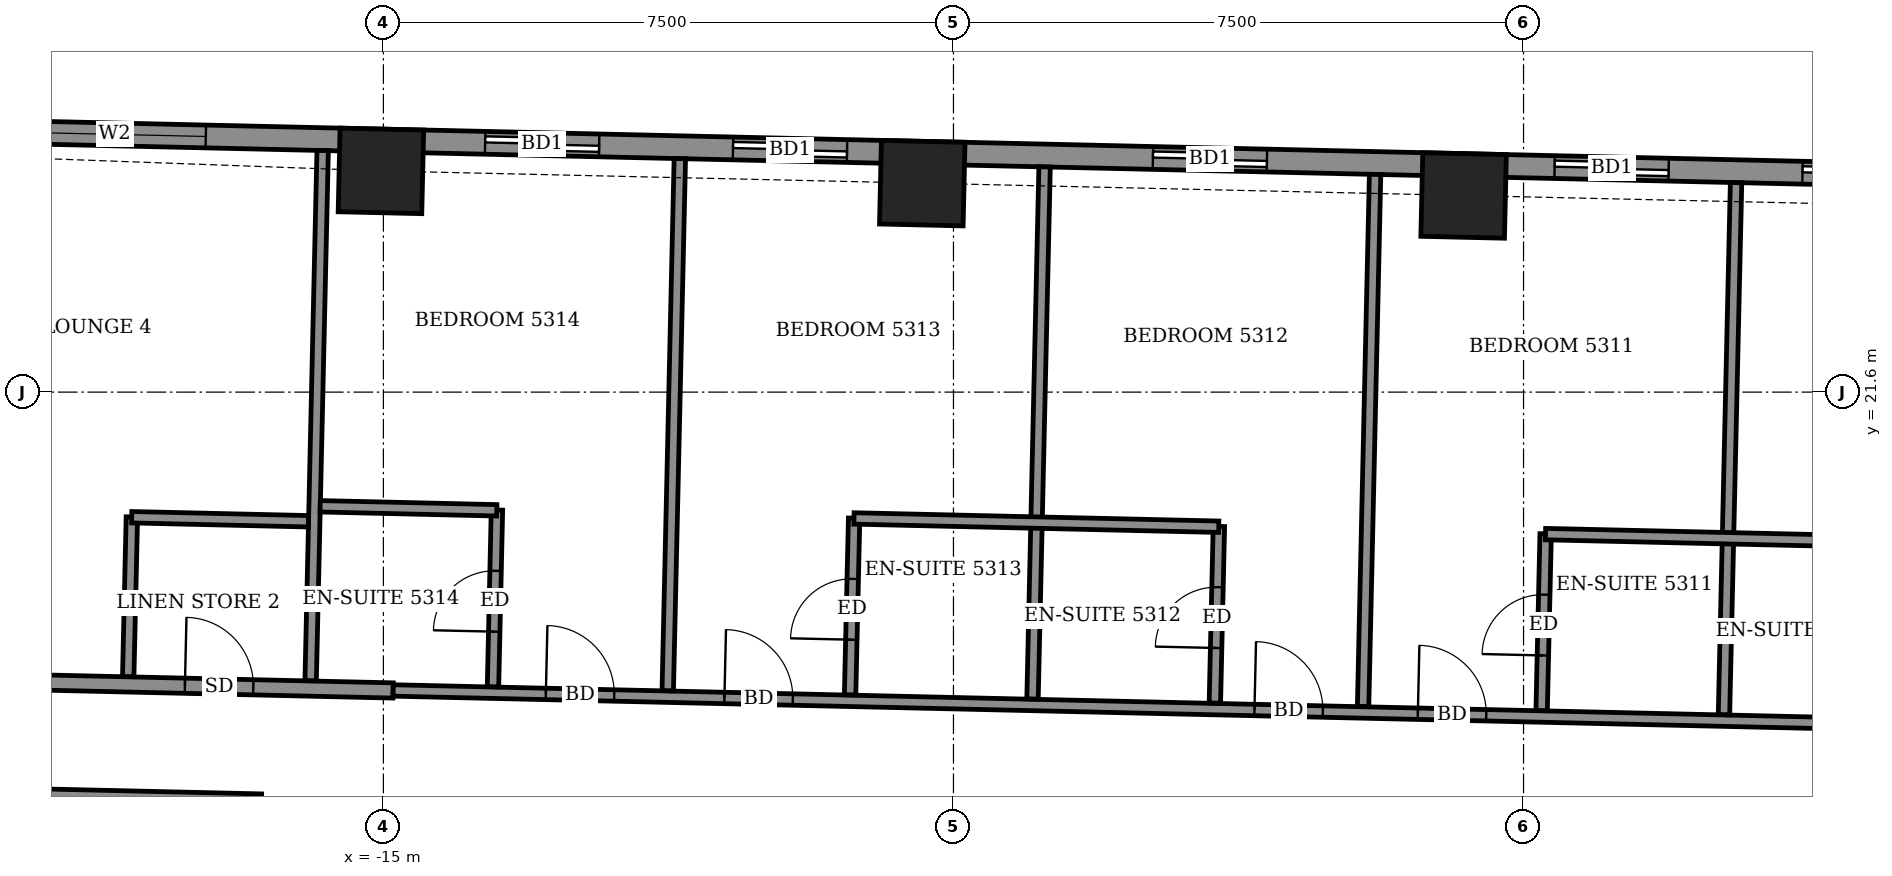
"""IFC4 building model, lengths in metres.
Left out: names, types, materials, properties, quantities, classifications, styles, units other than length and angle.
Written with IfcOpenShell. Run it as: python <this file> out.ifc"""

import sys

from ifc_helpers import new_model, si_unit, direction, frame, frame_2d, origin, origin_2d, place, context, subcontext, project, spatial, rectangle, extrude, element, fill, save


model = new_model("IFC4")
c1 = context("Model", 3, precision=1e-05, world=origin(), true_north=direction((0.0, 1.0)))
c2 = subcontext(c1, "Body", "Model", "MODEL_VIEW")
j1 = project(units=[si_unit("LENGTHUNIT", "METRE"), si_unit("PLANEANGLEUNIT", "RADIAN")], contexts=[c1])
p1 = place(None, origin())
s1 = spatial("IfcSite", under=j1, at=p1, CompositionType="ELEMENT")
p2 = place(p1, origin())
s2 = spatial("IfcBuilding", under=s1, at=p2, CompositionType="ELEMENT")
p3 = place(p2, frame((0.0, 0.0, 208.7)))
s3 = spatial("IfcBuildingStorey", under=s2, at=p3, CompositionType="ELEMENT", Elevation=208.7)
for number, where, z_axis, x_axis in (
    (1, (-0.789, 24.187, -0.55), (0.0, 0.0, 1.0), (-1.0, 0.023, 0.0)),
    (2, (-7.91, 24.349, -0.55), (0.0, 0.0, 1.0), (-1.0, 0.023, 0.0)),
    (3, (-15.032, 24.51, -0.55), (0.0, 0.0, 1.0), (-1.0, 0.023, 0.0)),
):
    element("IfcColumn", number, at=place(p3, frame(where, z_axis=z_axis, x_axis=x_axis)), inside=s3, PredefinedType="COLUMN", context=c2, shape_type="SweptSolid", body=[
        extrude(rectangle(XDim=1.1, YDim=1.1, at=origin_2d()), origin(), (0.0, 0.0, 1.0), 3.6),
    ])
p4 = place(p3, frame((20.437, 24.106, 0.0), z_axis=(0.0, 0.0, 1.0), x_axis=(-0.999742506232, 0.022691875925, 0.0)))
e4 = element("IfcWall", 4, at=p4, inside=s3, PredefinedType="SOLIDWALL", context=c2, shape_type="SweptSolid", body=[
    extrude(rectangle(XDim=42.444, YDim=0.3, at=frame_2d((21.222, 0.0))), origin(), (0.0, 0.0, 1.0), 2.55),
])
p5 = place(p4, frame((1.563, 0.0, 0.0)))
e5 = element("IfcOpeningElement", 5, at=p5, cuts=e4, PredefinedType="OPENING", context=c2, shape_type="SweptSolid", body=[
    extrude(rectangle(XDim=1.5, YDim=2.4, at=frame_2d((0.75, 1.2))), frame((0.0, 0.16, 0.0), z_axis=(0.0, -1.0, 0.0), x_axis=(1.0, 0.0, 0.0)), (0.0, 0.0, 1.0), 0.32),
])
p6 = place(p4, frame((4.584, 0.0, 0.0)))
e6 = element("IfcOpeningElement", 6, at=p6, cuts=e4, PredefinedType="OPENING", context=c2, shape_type="SweptSolid", body=[
    extrude(rectangle(XDim=1.5, YDim=2.4, at=frame_2d((0.75, 1.2))), frame((0.0, 0.16, 0.0), z_axis=(0.0, -1.0, 0.0), x_axis=(1.0, 0.0, 0.0)), (0.0, 0.0, 1.0), 0.32),
])
p7 = place(p4, frame((10.269, 0.0, 0.0)))
e7 = element("IfcOpeningElement", 7, at=p7, cuts=e4, PredefinedType="OPENING", context=c2, shape_type="SweptSolid", body=[
    extrude(rectangle(XDim=1.5, YDim=2.4, at=frame_2d((0.75, 1.2))), frame((0.0, 0.16, 0.0), z_axis=(0.0, -1.0, 0.0), x_axis=(1.0, 0.0, 0.0)), (0.0, 0.0, 1.0), 0.32),
])
p8 = place(p4, frame((15.271, 0.0, 0.0)))
e8 = element("IfcOpeningElement", 8, at=p8, cuts=e4, PredefinedType="OPENING", context=c2, shape_type="SweptSolid", body=[
    extrude(rectangle(XDim=1.5, YDim=2.4, at=frame_2d((0.75, 1.2))), frame((0.0, 0.16, 0.0), z_axis=(0.0, -1.0, 0.0), x_axis=(1.0, 0.0, 0.0)), (0.0, 0.0, 1.0), 0.32),
])
p9 = place(p4, frame((18.533, 0.0, 0.0)))
e9 = element("IfcOpeningElement", 9, at=p9, cuts=e4, PredefinedType="OPENING", context=c2, shape_type="SweptSolid", body=[
    extrude(rectangle(XDim=1.5, YDim=2.4, at=frame_2d((0.75, 1.2))), frame((0.0, 0.16, 0.0), z_axis=(0.0, -1.0, 0.0), x_axis=(1.0, 0.0, 0.0)), (0.0, 0.0, 1.0), 0.32),
])
p10 = place(p4, frame((23.819, 0.0, 0.0)))
e10 = element("IfcOpeningElement", 10, at=p10, cuts=e4, PredefinedType="OPENING", context=c2, shape_type="SweptSolid", body=[
    extrude(rectangle(XDim=1.5, YDim=2.4, at=frame_2d((0.75, 1.2))), frame((0.0, 0.16, 0.0), z_axis=(0.0, -1.0, 0.0), x_axis=(1.0, 0.0, 0.0)), (0.0, 0.0, 1.0), 0.32),
])
p11 = place(p4, frame((29.345, 0.0, 0.0)))
e11 = element("IfcOpeningElement", 11, at=p11, cuts=e4, PredefinedType="OPENING", context=c2, shape_type="SweptSolid", body=[
    extrude(rectangle(XDim=1.5, YDim=2.4, at=frame_2d((0.75, 1.2))), frame((0.0, 0.16, 0.0), z_axis=(0.0, -1.0, 0.0), x_axis=(1.0, 0.0, 0.0)), (0.0, 0.0, 1.0), 0.32),
])
p12 = place(p4, frame((32.607, 0.0, 0.0)))
e12 = element("IfcOpeningElement", 12, at=p12, cuts=e4, PredefinedType="OPENING", context=c2, shape_type="SweptSolid", body=[
    extrude(rectangle(XDim=1.5, YDim=2.4, at=frame_2d((0.75, 1.2))), frame((0.0, 0.16, 0.0), z_axis=(0.0, -1.0, 0.0), x_axis=(1.0, 0.0, 0.0)), (0.0, 0.0, 1.0), 0.32),
])
p13 = place(p4, frame((37.783, 0.0, 0.9)))
e13 = element("IfcOpeningElement", 13, at=p13, cuts=e4, PredefinedType="OPENING", context=c2, shape_type="SweptSolid", body=[
    extrude(rectangle(XDim=2.4, YDim=1.5, at=frame_2d((1.2, 0.75))), frame((0.0, 0.16, 0.0), z_axis=(0.0, -1.0, 0.0), x_axis=(1.0, 0.0, 0.0)), (0.0, 0.0, 1.0), 0.32),
])
p14 = place(p3, frame((-25.743, 16.422, 0.0), z_axis=(0.0, 0.0, 1.0), x_axis=(0.999741076645, -0.022754772455, 0.0)))
e14 = element("IfcWall", 14, at=p14, inside=s3, PredefinedType="PARTITIONING", context=c2, shape_type="SweptSolid", body=[
    extrude(rectangle(XDim=9.141, YDim=0.2, at=frame_2d((4.571, 0.0))), origin(), (0.0, 0.0, 1.0), 3.05),
])
p15 = place(p14, frame((3.371, 0.0, 0.0)))
e15 = element("IfcOpeningElement", 15, at=p15, cuts=e14, PredefinedType="OPENING", context=c2, shape_type="SweptSolid", body=[
    extrude(rectangle(XDim=1.0, YDim=2.1, at=frame_2d((0.5, 1.05))), frame((0.0, 0.11, 0.0), z_axis=(0.0, -1.0, 0.0), x_axis=(1.0, 0.0, 0.0)), (0.0, 0.0, 1.0), 0.22),
])
p16 = place(p3, frame((-25.709, 17.921, 0.0), z_axis=(0.0, 0.0, 1.0), x_axis=(0.999742764922, -0.022680475901, 0.0)))
e16 = element("IfcWall", 16, at=p16, inside=s3, PredefinedType="PARTITIONING", context=c2, shape_type="SweptSolid", body=[
    extrude(rectangle(XDim=10.84, YDim=0.2, at=frame_2d((5.42, 0.0))), origin(), (0.0, 0.0, 1.0), 3.05),
])
p17 = place(p16, frame((2.475, 0.0, 0.0)))
e17 = element("IfcOpeningElement", 17, at=p17, cuts=e16, PredefinedType="OPENING", context=c2, shape_type="SweptSolid", body=[
    extrude(rectangle(XDim=1.0, YDim=2.1, at=frame_2d((0.5, 1.05))), frame((0.0, 0.11, 0.0), z_axis=(0.0, -1.0, 0.0), x_axis=(1.0, 0.0, 0.0)), (0.0, 0.0, 1.0), 0.22),
])
p18 = place(p16, frame((8.1, 0.0, 0.0)))
e18 = element("IfcOpeningElement", 18, at=p18, cuts=e16, PredefinedType="OPENING", context=c2, shape_type="SweptSolid", body=[
    extrude(rectangle(XDim=0.9, YDim=2.1, at=frame_2d((0.45, 1.05))), frame((0.0, 0.11, 0.0), z_axis=(0.0, -1.0, 0.0), x_axis=(1.0, 0.0, 0.0)), (0.0, 0.0, 1.0), 0.22),
])
p19 = place(p3, frame((-14.871, 17.675, 0.0), z_axis=(0.0, 0.0, 1.0), x_axis=(0.999742359486, -0.02269834024, 0.0)))
e19 = element("IfcWall", 19, at=p19, inside=s3, PredefinedType="PARTITIONING", context=c2, shape_type="SweptSolid", body=[
    extrude(rectangle(XDim=30.536, YDim=0.15, at=frame_2d((15.268, 0.0))), origin(), (0.0, 0.0, 1.0), 3.05),
])
p20 = place(p19, frame((29.436, 0.0, 0.0)))
e20 = element("IfcOpeningElement", 20, at=p20, cuts=e19, PredefinedType="OPENING", context=c2, shape_type="SweptSolid", body=[
    extrude(rectangle(XDim=0.9, YDim=2.1, at=frame_2d((0.45, 1.05))), frame((0.0, 0.085, 0.0), z_axis=(0.0, -1.0, 0.0), x_axis=(1.0, 0.0, 0.0)), (0.0, 0.0, 1.0), 0.17),
])
p21 = place(p19, frame((22.484, 0.0, 0.0)))
e21 = element("IfcOpeningElement", 21, at=p21, cuts=e19, PredefinedType="OPENING", context=c2, shape_type="SweptSolid", body=[
    extrude(rectangle(XDim=0.9, YDim=2.1, at=frame_2d((0.45, 1.05))), frame((0.0, 0.085, 0.0), z_axis=(0.0, -1.0, 0.0), x_axis=(1.0, 0.0, 0.0)), (0.0, 0.0, 1.0), 0.17),
])
p22 = place(p19, frame((20.434, 0.0, 0.0)))
e22 = element("IfcOpeningElement", 22, at=p22, cuts=e19, PredefinedType="OPENING", context=c2, shape_type="SweptSolid", body=[
    extrude(rectangle(XDim=0.9, YDim=2.1, at=frame_2d((0.45, 1.05))), frame((0.0, 0.085, 0.0), z_axis=(0.0, -1.0, 0.0), x_axis=(1.0, 0.0, 0.0)), (0.0, 0.0, 1.0), 0.17),
])
p23 = place(p19, frame((13.484, 0.0, 0.0)))
e23 = element("IfcOpeningElement", 23, at=p23, cuts=e19, PredefinedType="OPENING", context=c2, shape_type="SweptSolid", body=[
    extrude(rectangle(XDim=0.9, YDim=2.1, at=frame_2d((0.45, 1.05))), frame((0.0, 0.085, 0.0), z_axis=(0.0, -1.0, 0.0), x_axis=(1.0, 0.0, 0.0)), (0.0, 0.0, 1.0), 0.17),
])
p24 = place(p19, frame((11.334, 0.0, 0.0)))
e24 = element("IfcOpeningElement", 24, at=p24, cuts=e19, PredefinedType="OPENING", context=c2, shape_type="SweptSolid", body=[
    extrude(rectangle(XDim=0.9, YDim=2.1, at=frame_2d((0.45, 1.05))), frame((0.0, 0.085, 0.0), z_axis=(0.0, -1.0, 0.0), x_axis=(1.0, 0.0, 0.0)), (0.0, 0.0, 1.0), 0.17),
])
p25 = place(p19, frame((4.359, 0.0, 0.0)))
e25 = element("IfcOpeningElement", 25, at=p25, cuts=e19, PredefinedType="OPENING", context=c2, shape_type="SweptSolid", body=[
    extrude(rectangle(XDim=0.9, YDim=2.1, at=frame_2d((0.45, 1.05))), frame((0.0, 0.085, 0.0), z_axis=(0.0, -1.0, 0.0), x_axis=(1.0, 0.0, 0.0)), (0.0, 0.0, 1.0), 0.17),
])
p26 = place(p19, frame((2.009, 0.0, 0.0)))
e26 = element("IfcOpeningElement", 26, at=p26, cuts=e19, PredefinedType="OPENING", context=c2, shape_type="SweptSolid", body=[
    extrude(rectangle(XDim=0.9, YDim=2.1, at=frame_2d((0.45, 1.05))), frame((0.0, 0.085, 0.0), z_axis=(0.0, -1.0, 0.0), x_axis=(1.0, 0.0, 0.0)), (0.0, 0.0, 1.0), 0.17),
])
p27 = place(p3, frame((-18.357, 17.858, 0.0), z_axis=(0.0, 0.0, 1.0), x_axis=(0.022779486249, 0.999740513837, 0.0)))
e27 = element("IfcWall", 27, at=p27, inside=s3, PredefinedType="PARTITIONING", context=c2, shape_type="SweptSolid", body=[
    extrude(rectangle(XDim=2.101, YDim=0.15, at=frame_2d((1.05, 0.0))), origin(), (0.0, 0.0, 1.0), 3.05),
])
p28 = place(p3, frame((-15.957, 17.804, 0.0), z_axis=(0.0, 0.0, 1.0), x_axis=(0.022643496158, 0.999743603171, 0.0)))
e28 = element("IfcWall", 28, at=p28, inside=s3, PredefinedType="PARTITIONING", context=c2, shape_type="SweptSolid", body=[
    extrude(rectangle(XDim=6.976, YDim=0.15, at=frame_2d((3.488, 0.0))), origin(), (0.0, 0.0, 1.0), 2.55),
])
p29 = place(p3, frame((-13.558, 17.724, 0.0), z_axis=(0.0, 0.0, 1.0), x_axis=(0.022361308448, 0.999749954681, 0.0)))
e29 = element("IfcWall", 29, at=p29, inside=s3, PredefinedType="PARTITIONING", context=c2, shape_type="SweptSolid", body=[
    extrude(rectangle(XDim=2.325, YDim=0.15, at=frame_2d((1.163, 0.0))), origin(), (0.0, 0.0, 1.0), 3.05),
])
p30 = place(p29, frame((0.725, 0.0, 0.0)))
e30 = element("IfcOpeningElement", 30, at=p30, cuts=e29, PredefinedType="OPENING", context=c2, shape_type="SweptSolid", body=[
    extrude(rectangle(XDim=0.8, YDim=2.1, at=frame_2d((0.4, 1.05))), frame((0.0, 0.085, 0.0), z_axis=(0.0, -1.0, 0.0), x_axis=(1.0, 0.0, 0.0)), (0.0, 0.0, 1.0), 0.17),
])
p31 = place(p3, frame((-11.259, 17.672, 0.0), z_axis=(0.0, 0.0, 1.0), x_axis=(0.022699227919, 0.999742339331, 0.0)))
e31 = element("IfcWall", 31, at=p31, inside=s3, PredefinedType="PARTITIONING", context=c2, shape_type="SweptSolid", body=[
    extrude(rectangle(XDim=7.002, YDim=0.15, at=frame_2d((3.501, 0.0))), origin(), (0.0, 0.0, 1.0), 2.5),
])
p32 = place(p3, frame((-8.86, 17.618, 0.0), z_axis=(0.0, 0.0, 1.0), x_axis=(0.022895561926, 0.999737862264, 0.0)))
e32 = element("IfcWall", 32, at=p32, inside=s3, PredefinedType="PARTITIONING", context=c2, shape_type="SweptSolid", body=[
    extrude(rectangle(XDim=2.324, YDim=0.15, at=frame_2d((1.162, 0.0))), origin(), (0.0, 0.0, 1.0), 3.05),
])
p33 = place(p32, frame((0.725, 0.0, 0.0)))
e33 = element("IfcOpeningElement", 33, at=p33, cuts=e32, PredefinedType="OPENING", context=c2, shape_type="SweptSolid", body=[
    extrude(rectangle(XDim=0.8, YDim=2.1, at=frame_2d((0.4, 1.05))), frame((0.0, 0.085, 0.0), z_axis=(0.0, -1.0, 0.0), x_axis=(1.0, 0.0, 0.0)), (0.0, 0.0, 1.0), 0.17),
])
p34 = place(p3, frame((-6.46, 17.563, 0.0), z_axis=(0.0, 0.0, 1.0), x_axis=(0.022699227919, 0.999742339331, 0.0)))
e34 = element("IfcWall", 34, at=p34, inside=s3, PredefinedType="PARTITIONING", context=c2, shape_type="SweptSolid", body=[
    extrude(rectangle(XDim=7.002, YDim=0.15, at=frame_2d((3.501, 0.0))), origin(), (0.0, 0.0, 1.0), 2.5),
])
p35 = place(p3, frame((-4.061, 17.509, 0.0), z_axis=(0.0, 0.0, 1.0), x_axis=(0.02279059109, 0.999740260747, 0.0)))
e35 = element("IfcWall", 35, at=p35, inside=s3, PredefinedType="PARTITIONING", context=c2, shape_type="SweptSolid", body=[
    extrude(rectangle(XDim=2.324, YDim=0.15, at=frame_2d((1.162, 0.0))), origin(), (0.0, 0.0, 1.0), 3.05),
])
p36 = place(p35, frame((0.725, 0.0, 0.0)))
e36 = element("IfcOpeningElement", 36, at=p36, cuts=e35, PredefinedType="OPENING", context=c2, shape_type="SweptSolid", body=[
    extrude(rectangle(XDim=0.8, YDim=2.1, at=frame_2d((0.4, 1.05))), frame((0.0, 0.085, 0.0), z_axis=(0.0, -1.0, 0.0), x_axis=(1.0, 0.0, 0.0)), (0.0, 0.0, 1.0), 0.17),
])
p37 = place(p3, frame((-2.111, 17.465, 0.0), z_axis=(0.0, 0.0, 1.0), x_axis=(0.022597827698, 0.999744636486, 0.0)))
e37 = element("IfcWall", 37, at=p37, inside=s3, PredefinedType="PARTITIONING", context=c2, shape_type="SweptSolid", body=[
    extrude(rectangle(XDim=7.001, YDim=0.15, at=frame_2d((3.5, 0.0))), origin(), (0.0, 0.0, 1.0), 2.5),
])
p38 = place(p3, frame((0.238, 17.411, 0.0), z_axis=(0.0, 0.0, 1.0), x_axis=(0.022778632478, 0.99974053329, 0.0)))
e38 = element("IfcWall", 38, at=p38, inside=s3, PredefinedType="PARTITIONING", context=c2, shape_type="SweptSolid", body=[
    extrude(rectangle(XDim=2.326, YDim=0.15, at=frame_2d((1.163, 0.0))), origin(), (0.0, 0.0, 1.0), 3.05),
])
p39 = place(p38, frame((0.725, 0.0, 0.0)))
e39 = element("IfcOpeningElement", 39, at=p39, cuts=e38, PredefinedType="OPENING", context=c2, shape_type="SweptSolid", body=[
    extrude(rectangle(XDim=0.8, YDim=2.1, at=frame_2d((0.4, 1.05))), frame((0.0, 0.085, 0.0), z_axis=(0.0, -1.0, 0.0), x_axis=(1.0, 0.0, 0.0)), (0.0, 0.0, 1.0), 0.17),
])
p40 = place(p3, frame((2.637, 17.357, 0.0), z_axis=(0.0, 0.0, 1.0), x_axis=(0.022702393474, 0.999742267452, 0.0)))
e40 = element("IfcWall", 40, at=p40, inside=s3, PredefinedType="PARTITIONING", context=c2, shape_type="SweptSolid", body=[
    extrude(rectangle(XDim=7.001, YDim=0.15, at=frame_2d((3.5, 0.0))), origin(), (0.0, 0.0, 1.0), 2.5),
])
for number, where, z_axis, x_axis in (
    (41, (-18.311, 19.954, 0.0), (0.0, 0.0, 1.0), (1.0, -0.023, 0.0)),
    (42, (-15.832, 20.098, 0.0), (0.0, 0.0, 1.0), (1.0, -0.023, 0.0)),
):
    element("IfcWall", number, at=place(p3, frame(where, z_axis=z_axis, x_axis=x_axis)), inside=s3, PredefinedType="PARTITIONING", context=c2, shape_type="SweptSolid", body=[
        extrude(rectangle(XDim=2.324, YDim=0.15, at=frame_2d((1.162, 0.0))), origin(), (0.0, 0.0, 1.0), 3.05),
    ])
p41 = place(p3, frame((-8.809, 19.938, 0.0), z_axis=(0.0, 0.0, 1.0), x_axis=(0.999742701292, -0.022683280499, 0.0)))
e43 = element("IfcWall", 43, at=p41, inside=s3, PredefinedType="PARTITIONING", context=c2, shape_type="SweptSolid", body=[
    extrude(rectangle(XDim=4.8, YDim=0.15, at=frame_2d((2.4, 0.0))), origin(), (0.0, 0.0, 1.0), 3.05),
])
p42 = place(p3, frame((0.289, 19.732, 0.0), z_axis=(0.0, 0.0, 1.0), x_axis=(0.999742570398, -0.022689048768, 0.0)))
e44 = element("IfcWall", 44, at=p42, inside=s3, PredefinedType="PARTITIONING", context=c2, shape_type="SweptSolid", body=[
    extrude(rectangle(XDim=4.799, YDim=0.15, at=frame_2d((2.399, 0.0))), origin(), (0.0, 0.0, 1.0), 3.05),
])
p43 = place(p8, origin())
e45 = element("IfcDoor", 45, at=p43, inside=s3, OperationType="SLIDING_TO_LEFT", PredefinedType="DOOR", context=c2, shape_type="SweptSolid", body=[
    extrude(rectangle(XDim=1.5, YDim=2.4, at=frame_2d((0.75, 1.2))), frame((0.0, 0.025, 0.0), z_axis=(0.0, -1.0, 0.0), x_axis=(1.0, 0.0, 0.0)), (0.0, 0.0, 1.0), 0.05),
])
fill(e8, e45)
p44 = place(p9, origin())
e46 = element("IfcDoor", 46, at=p44, inside=s3, OperationType="SLIDING_TO_LEFT", PredefinedType="DOOR", context=c2, shape_type="SweptSolid", body=[
    extrude(rectangle(XDim=1.5, YDim=2.4, at=frame_2d((0.75, 1.2))), frame((0.0, 0.025, 0.0), z_axis=(0.0, -1.0, 0.0), x_axis=(1.0, 0.0, 0.0)), (0.0, 0.0, 1.0), 0.05),
])
fill(e9, e46)
p45 = place(p10, origin())
e47 = element("IfcDoor", 47, at=p45, inside=s3, OperationType="SLIDING_TO_LEFT", PredefinedType="DOOR", context=c2, shape_type="SweptSolid", body=[
    extrude(rectangle(XDim=1.5, YDim=2.4, at=frame_2d((0.75, 1.2))), frame((0.0, 0.025, 0.0), z_axis=(0.0, -1.0, 0.0), x_axis=(1.0, 0.0, 0.0)), (0.0, 0.0, 1.0), 0.05),
])
fill(e10, e47)
p46 = place(p11, origin())
e48 = element("IfcDoor", 48, at=p46, inside=s3, OperationType="SLIDING_TO_LEFT", PredefinedType="DOOR", context=c2, shape_type="SweptSolid", body=[
    extrude(rectangle(XDim=1.5, YDim=2.4, at=frame_2d((0.75, 1.2))), frame((0.0, 0.025, 0.0), z_axis=(0.0, -1.0, 0.0), x_axis=(1.0, 0.0, 0.0)), (0.0, 0.0, 1.0), 0.05),
])
fill(e11, e48)
p47 = place(p12, origin())
e49 = element("IfcDoor", 49, at=p47, inside=s3, OperationType="SLIDING_TO_LEFT", PredefinedType="DOOR", context=c2, shape_type="SweptSolid", body=[
    extrude(rectangle(XDim=1.5, YDim=2.4, at=frame_2d((0.75, 1.2))), frame((0.0, 0.025, 0.0), z_axis=(0.0, -1.0, 0.0), x_axis=(1.0, 0.0, 0.0)), (0.0, 0.0, 1.0), 0.05),
])
fill(e12, e49)
p48 = place(p13, origin())
e50 = element("IfcWindow", 50, at=p48, inside=s3, PartitioningType="DOUBLE_PANEL_VERTICAL", PredefinedType="WINDOW", context=c2, shape_type="SweptSolid", body=[
    extrude(rectangle(XDim=2.4, YDim=1.5, at=frame_2d((1.2, 0.75))), frame((0.0, 0.03, 0.0), z_axis=(0.0, -1.0, 0.0), x_axis=(1.0, 0.0, 0.0)), (0.0, 0.0, 1.0), 0.06),
])
fill(e13, e50)
p49 = place(p23, origin())
e51 = element("IfcDoor", 51, at=p49, inside=s3, OperationType="SINGLE_SWING_LEFT", PredefinedType="DOOR", context=c2, shape_type="SweptSolid", body=[
    extrude(rectangle(XDim=0.9, YDim=2.1, at=frame_2d((0.45, 1.05))), frame((0.0, 0.025, 0.0), z_axis=(0.0, -1.0, 0.0), x_axis=(1.0, 0.0, 0.0)), (0.0, 0.0, 1.0), 0.05),
])
fill(e23, e51)
p50 = place(p39, origin())
e52 = element("IfcDoor", 52, at=p50, inside=s3, OperationType="SINGLE_SWING_LEFT", PredefinedType="DOOR", context=c2, shape_type="SweptSolid", body=[
    extrude(rectangle(XDim=0.8, YDim=2.1, at=frame_2d((0.4, 1.05))), frame((0.0, 0.025, 0.0), z_axis=(0.0, -1.0, 0.0), x_axis=(1.0, 0.0, 0.0)), (0.0, 0.0, 1.0), 0.05),
])
fill(e39, e52)
p51 = place(p24, origin())
e53 = element("IfcDoor", 53, at=p51, inside=s3, OperationType="SINGLE_SWING_RIGHT", PredefinedType="DOOR", context=c2, shape_type="SweptSolid", body=[
    extrude(rectangle(XDim=0.9, YDim=2.1, at=frame_2d((0.45, 1.05))), frame((0.0, 0.025, 0.0), z_axis=(0.0, -1.0, 0.0), x_axis=(1.0, 0.0, 0.0)), (0.0, 0.0, 1.0), 0.05),
])
fill(e24, e53)
p52 = place(p36, origin())
e54 = element("IfcDoor", 54, at=p52, inside=s3, OperationType="SINGLE_SWING_RIGHT", PredefinedType="DOOR", context=c2, shape_type="SweptSolid", body=[
    extrude(rectangle(XDim=0.8, YDim=2.1, at=frame_2d((0.4, 1.05))), frame((0.0, 0.025, 0.0), z_axis=(0.0, -1.0, 0.0), x_axis=(1.0, 0.0, 0.0)), (0.0, 0.0, 1.0), 0.05),
])
fill(e36, e54)
p53 = place(p25, origin())
e55 = element("IfcDoor", 55, at=p53, inside=s3, OperationType="SINGLE_SWING_LEFT", PredefinedType="DOOR", context=c2, shape_type="SweptSolid", body=[
    extrude(rectangle(XDim=0.9, YDim=2.1, at=frame_2d((0.45, 1.05))), frame((0.0, 0.025, 0.0), z_axis=(0.0, -1.0, 0.0), x_axis=(1.0, 0.0, 0.0)), (0.0, 0.0, 1.0), 0.05),
])
fill(e25, e55)
p54 = place(p33, origin())
e56 = element("IfcDoor", 56, at=p54, inside=s3, OperationType="SINGLE_SWING_LEFT", PredefinedType="DOOR", context=c2, shape_type="SweptSolid", body=[
    extrude(rectangle(XDim=0.8, YDim=2.1, at=frame_2d((0.4, 1.05))), frame((0.0, 0.025, 0.0), z_axis=(0.0, -1.0, 0.0), x_axis=(1.0, 0.0, 0.0)), (0.0, 0.0, 1.0), 0.05),
])
fill(e33, e56)
p55 = place(p26, origin())
e57 = element("IfcDoor", 57, at=p55, inside=s3, OperationType="SINGLE_SWING_RIGHT", PredefinedType="DOOR", context=c2, shape_type="SweptSolid", body=[
    extrude(rectangle(XDim=0.9, YDim=2.1, at=frame_2d((0.45, 1.05))), frame((0.0, 0.025, 0.0), z_axis=(0.0, -1.0, 0.0), x_axis=(1.0, 0.0, 0.0)), (0.0, 0.0, 1.0), 0.05),
])
fill(e26, e57)
p56 = place(p30, origin())
e58 = element("IfcDoor", 58, at=p56, inside=s3, OperationType="SINGLE_SWING_RIGHT", PredefinedType="DOOR", context=c2, shape_type="SweptSolid", body=[
    extrude(rectangle(XDim=0.8, YDim=2.1, at=frame_2d((0.4, 1.05))), frame((0.0, 0.025, 0.0), z_axis=(0.0, -1.0, 0.0), x_axis=(1.0, 0.0, 0.0)), (0.0, 0.0, 1.0), 0.05),
])
fill(e30, e58)
p57 = place(p18, origin())
e59 = element("IfcDoor", 59, at=p57, inside=s3, OperationType="SINGLE_SWING_LEFT", PredefinedType="DOOR", context=c2, shape_type="SweptSolid", body=[
    extrude(rectangle(XDim=0.9, YDim=2.1, at=frame_2d((0.45, 1.05))), frame((0.0, 0.025, 0.0), z_axis=(0.0, -1.0, 0.0), x_axis=(1.0, 0.0, 0.0)), (0.0, 0.0, 1.0), 0.05),
])
fill(e18, e59)
save(model, sys.argv[1])
